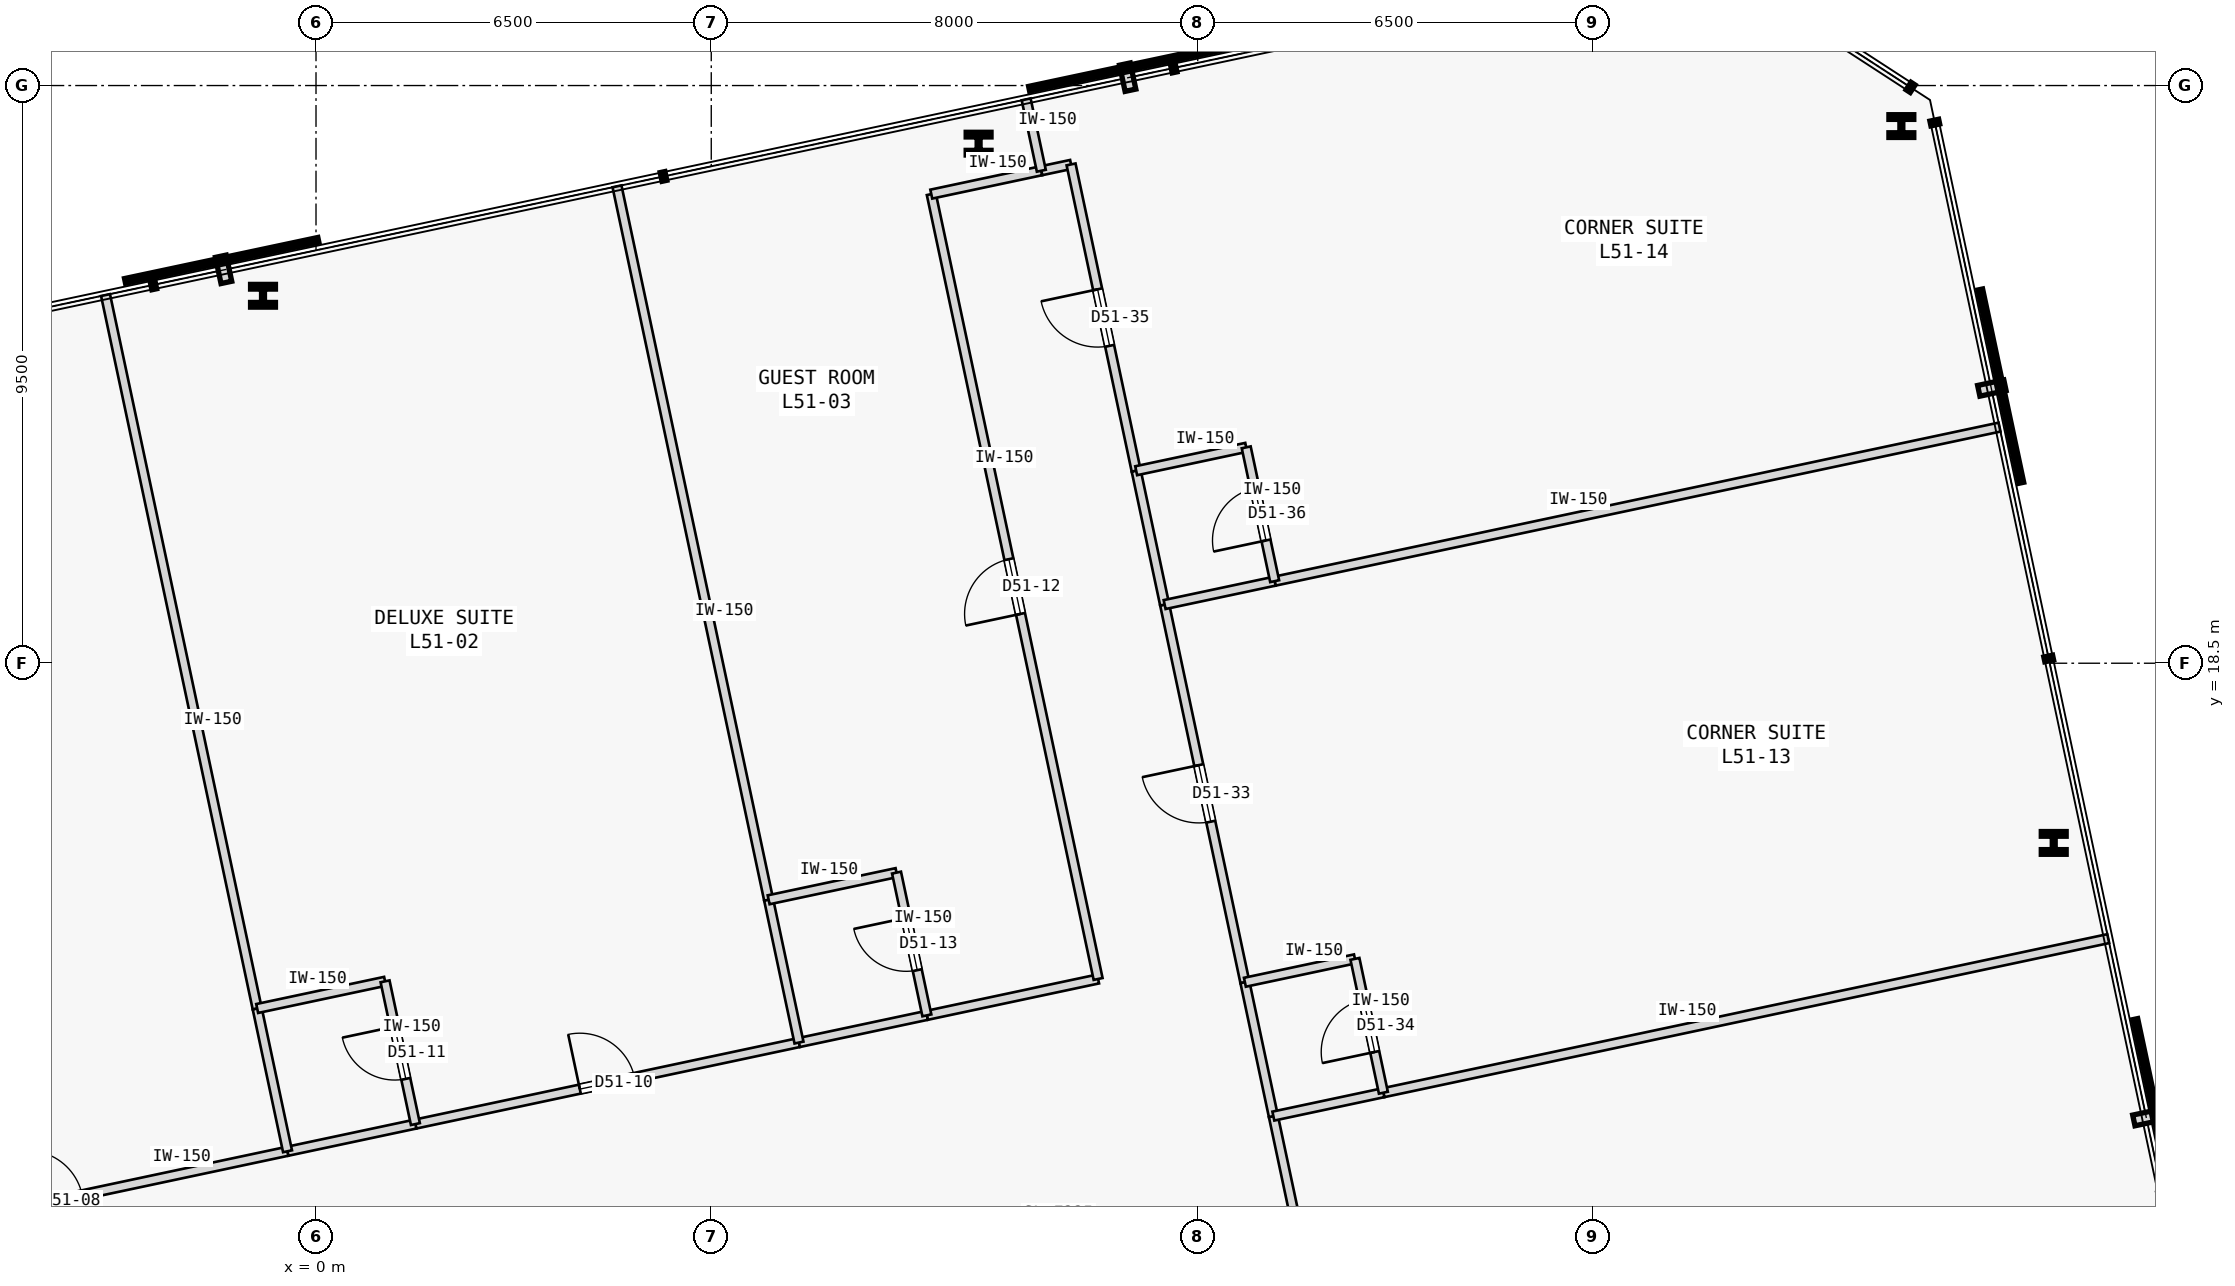
"""IFC4 building model, lengths in metres.
Left out: names, types, materials, properties, quantities, classifications, styles, units other than length and angle.
Written with IfcOpenShell. Run it as: python <this file> out.ifc"""

import sys

from ifc_helpers import new_model, si_unit, direction, frame, frame_2d, origin, origin_2d, place, context, subcontext, project, spatial, rectangle, i_section, extrude, element, fill, save


model = new_model("IFC4")
c1 = context("Model", 3, precision=1e-05, world=origin(), true_north=direction((0.0, 1.0)))
c2 = subcontext(c1, "Body", "Model", "MODEL_VIEW")
j1 = project(units=[si_unit("LENGTHUNIT", "METRE"), si_unit("PLANEANGLEUNIT", "RADIAN")], contexts=[c1])
p1 = place(None, origin())
s1 = spatial("IfcSite", under=j1, at=p1, CompositionType="ELEMENT")
p2 = place(p1, origin())
s2 = spatial("IfcBuilding", under=s1, at=p2, CompositionType="ELEMENT")
p3 = place(p2, frame((0.0, 0.0, 195.6)))
s3 = spatial("IfcBuildingStorey", under=s2, at=p3, CompositionType="ELEMENT", Elevation=195.6)
for number, where, z_axis, x_axis in (
    (1, (28.577, 15.545, 0.0), (0.0, 0.0, 1.0), (1.0, 0.0, 0.0)),
    (2, (26.071, 27.333, 0.0), (0.0, 0.0, 1.0), (1.0, 0.0, 0.0)),
    (3, (10.896, 27.044, 0.0), (0.0, 0.0, 1.0), (1.0, 0.0, 0.0)),
    (4, (-0.872, 24.543, 0.0), (0.0, 0.0, 1.0), (1.0, 0.0, 0.0)),
):
    element("IfcColumn", number, at=place(p3, frame(where, z_axis=z_axis, x_axis=x_axis)), inside=s3, PredefinedType="COLUMN", context=c2, shape_type="SweptSolid", body=[
        extrude(i_section(OverallWidth=0.409, OverallDepth=0.374, WebThickness=0.048, FlangeThickness=0.077, FilletRadius=0.015, at=origin_2d()), origin(), (0.0, 0.0, 1.0), 3.4),
    ])
p4 = place(p3, frame((-8.121, 8.848, 0.0), z_axis=(0.0, 0.0, 1.0), x_axis=(0.978146318695, 0.207917722244, 0.0)))
e5 = element("IfcWall", 5, at=p4, inside=s3, PredefinedType="PARTITIONING", context=c2, shape_type="SweptSolid", body=[
    extrude(rectangle(XDim=7.824, YDim=0.15, at=frame_2d((3.912, 0.0))), origin(), (0.0, 0.0, 1.0), 3.175),
])
p5 = place(p4, frame((3.452, 0.0, 0.0)))
e6 = element("IfcOpeningElement", 6, at=p5, cuts=e5, PredefinedType="OPENING", context=c2, shape_type="SweptSolid", body=[
    extrude(rectangle(XDim=0.92, YDim=2.15, at=frame_2d((0.46, 1.075))), frame((0.0, 0.085, 0.0), z_axis=(0.0, -1.0, 0.0), x_axis=(1.0, 0.0, 0.0)), (0.0, 0.0, 1.0), 0.17),
])
p6 = place(p3, frame((1.635, 10.921, 0.0), z_axis=(0.0, 0.0, 1.0), x_axis=(0.978147881284, 0.207910370927, 0.0)))
e7 = element("IfcWall", 7, at=p6, inside=s3, PredefinedType="PARTITIONING", context=c2, shape_type="SweptSolid", body=[
    extrude(rectangle(XDim=6.449, YDim=0.15, at=frame_2d((3.225, 0.0))), origin(), (0.0, 0.0, 1.0), 3.175),
])
p7 = place(p6, frame((2.764, 0.0, 0.0)))
e8 = element("IfcOpeningElement", 8, at=p7, cuts=e7, PredefinedType="OPENING", context=c2, shape_type="SweptSolid", body=[
    extrude(rectangle(XDim=0.92, YDim=2.15, at=frame_2d((0.46, 1.075))), frame((0.0, 0.085, 0.0), z_axis=(0.0, -1.0, 0.0), x_axis=(1.0, 0.0, 0.0)), (0.0, 0.0, 1.0), 0.17),
])
p8 = place(p3, frame((-0.469, 10.474, 0.0), z_axis=(0.0, 0.0, 1.0), x_axis=(0.978146728319, 0.207915795165, 0.0)))
e9 = element("IfcWall", 9, at=p8, inside=s3, PredefinedType="PARTITIONING", context=c2, shape_type="SweptSolid", body=[
    extrude(rectangle(XDim=2.15, YDim=0.15, at=frame_2d((1.075, 0.0))), origin(), (0.0, 0.0, 1.0), 3.175),
])
p9 = place(p3, frame((10.046, 12.709, 0.0), z_axis=(0.0, 0.0, 1.0), x_axis=(0.97816208355, 0.207843542851, 0.0)))
e10 = element("IfcWall", 10, at=p9, inside=s3, PredefinedType="PARTITIONING", context=c2, shape_type="SweptSolid", body=[
    extrude(rectangle(XDim=2.879, YDim=0.15, at=frame_2d((1.439, 0.0))), origin(), (0.0, 0.0, 1.0), 3.175),
])
p10 = place(p3, frame((12.862, 13.308, 0.0), z_axis=(0.0, 0.0, 1.0), x_axis=(-0.207911421929, 0.978147657888, 0.0)))
e11 = element("IfcWall", 11, at=p10, inside=s3, PredefinedType="PARTITIONING", context=c2, shape_type="SweptSolid", body=[
    extrude(rectangle(XDim=13.195, YDim=0.15, at=frame_2d((6.598, 0.0))), origin(), (0.0, 0.0, 1.0), 3.175),
])
p11 = place(p10, frame((6.137, 0.0, 0.0)))
e12 = element("IfcOpeningElement", 12, at=p11, cuts=e11, PredefinedType="OPENING", context=c2, shape_type="SweptSolid", body=[
    extrude(rectangle(XDim=0.92, YDim=2.15, at=frame_2d((0.46, 1.075))), frame((0.0, 0.085, 0.0), z_axis=(0.0, -1.0, 0.0), x_axis=(1.0, 0.0, 0.0)), (0.0, 0.0, 1.0), 0.17),
])
p12 = place(p3, frame((10.118, 26.214, 0.0), z_axis=(0.0, 0.0, 1.0), x_axis=(0.978133353907, 0.20797870558, 0.0)))
e13 = element("IfcWall", 13, at=p12, inside=s3, PredefinedType="PARTITIONING", context=c2, shape_type="SweptSolid", body=[
    extrude(rectangle(XDim=1.85, YDim=0.15, at=frame_2d((0.925, 0.0))), origin(), (0.0, 0.0, 1.0), 3.175),
])
p13 = place(p3, frame((7.943, 12.262, 0.0), z_axis=(0.0, 0.0, 1.0), x_axis=(0.978146728319, 0.207915795165, 0.0)))
e14 = element("IfcWall", 14, at=p13, inside=s3, PredefinedType="PARTITIONING", context=c2, shape_type="SweptSolid", body=[
    extrude(rectangle(XDim=2.15, YDim=0.15, at=frame_2d((1.075, 0.0))), origin(), (0.0, 0.0, 1.0), 3.175),
])
p14 = place(p3, frame((17.064, 4.841, 0.0), z_axis=(0.0, 0.0, 1.0), x_axis=(-0.207924511115, 0.978144875608, 0.0)))
e15 = element("IfcWall", 15, at=p14, inside=s3, PredefinedType="PARTITIONING", context=c2, shape_type="SweptSolid", body=[
    extrude(rectangle(XDim=6.35, YDim=0.15, at=frame_2d((3.175, 0.0))), origin(), (0.0, 0.0, 1.0), 3.175),
])
p15 = place(p14, frame((2.7, 0.0, 0.0)))
e16 = element("IfcOpeningElement", 16, at=p15, cuts=e15, PredefinedType="OPENING", context=c2, shape_type="SweptSolid", body=[
    extrude(rectangle(XDim=0.95, YDim=2.15, at=frame_2d((0.475, 1.075))), frame((0.0, 0.085, 0.0), z_axis=(0.0, -1.0, 0.0), x_axis=(1.0, 0.0, 0.0)), (0.0, 0.0, 1.0), 0.17),
])
p16 = place(p3, frame((15.276, 13.253, 0.0), z_axis=(0.0, 0.0, 1.0), x_axis=(-0.207924511115, 0.978144875608, 0.0)))
e17 = element("IfcWall", 17, at=p16, inside=s3, PredefinedType="PARTITIONING", context=c2, shape_type="SweptSolid", body=[
    extrude(rectangle(XDim=6.35, YDim=0.15, at=frame_2d((3.175, 0.0))), origin(), (0.0, 0.0, 1.0), 3.175),
])
p17 = place(p16, frame((2.7, 0.0, 0.0)))
e18 = element("IfcOpeningElement", 18, at=p17, cuts=e17, PredefinedType="OPENING", context=c2, shape_type="SweptSolid", body=[
    extrude(rectangle(XDim=0.95, YDim=2.15, at=frame_2d((0.475, 1.075))), frame((0.0, 0.085, 0.0), z_axis=(0.0, -1.0, 0.0), x_axis=(1.0, 0.0, 0.0)), (0.0, 0.0, 1.0), 0.17),
])
p18 = place(p3, frame((15.744, 11.052, 0.0), z_axis=(0.0, 0.0, 1.0), x_axis=(-0.207891197838, 0.978151956427, 0.0)))
e19 = element("IfcWall", 19, at=p18, inside=s3, PredefinedType="PARTITIONING", context=c2, shape_type="SweptSolid", body=[
    extrude(rectangle(XDim=2.25, YDim=0.15, at=frame_2d((1.125, 0.0))), origin(), (0.0, 0.0, 1.0), 3.175),
])
p19 = place(p3, frame((11.928, 26.599, 0.0), z_axis=(0.0, 0.0, 1.0), x_axis=(0.97822210712, 0.207560856478, 0.0)))
e20 = element("IfcWall", 20, at=p19, inside=s3, PredefinedType="PARTITIONING", context=c2, shape_type="SweptSolid", body=[
    extrude(rectangle(XDim=0.5, YDim=0.15, at=frame_2d((0.25, 0.0))), origin(), (0.0, 0.0, 1.0), 3.175),
])
p20 = place(p3, frame((13.488, 21.666, 0.0), z_axis=(0.0, 0.0, 1.0), x_axis=(-0.207926226209, 0.978144511028, 0.0)))
e21 = element("IfcWall", 21, at=p20, inside=s3, PredefinedType="PARTITIONING", context=c2, shape_type="SweptSolid", body=[
    extrude(rectangle(XDim=5.15, YDim=0.15, at=frame_2d((2.575, 0.0))), origin(), (0.0, 0.0, 1.0), 3.175),
])
p21 = place(p20, frame((2.1, 0.0, 0.0)))
e22 = element("IfcOpeningElement", 22, at=p21, cuts=e21, PredefinedType="OPENING", context=c2, shape_type="SweptSolid", body=[
    extrude(rectangle(XDim=0.95, YDim=2.15, at=frame_2d((0.475, 1.075))), frame((0.0, 0.085, 0.0), z_axis=(0.0, -1.0, 0.0), x_axis=(1.0, 0.0, 0.0)), (0.0, 0.0, 1.0), 0.17),
])
p22 = place(p3, frame((13.956, 19.465, 0.0), z_axis=(0.0, 0.0, 1.0), x_axis=(-0.207891197838, 0.978151956427, 0.0)))
e23 = element("IfcWall", 23, at=p22, inside=s3, PredefinedType="PARTITIONING", context=c2, shape_type="SweptSolid", body=[
    extrude(rectangle(XDim=2.25, YDim=0.15, at=frame_2d((1.125, 0.0))), origin(), (0.0, 0.0, 1.0), 3.175),
])
p23 = place(p3, frame((-0.967, 12.822, 0.0), z_axis=(0.0, 0.0, 1.0), x_axis=(-0.207914988081, 0.978146899873, 0.0)))
e24 = element("IfcWall", 24, at=p23, inside=s3, PredefinedType="PARTITIONING", context=c2, shape_type="SweptSolid", body=[
    extrude(rectangle(XDim=11.995, YDim=0.15, at=frame_2d((5.998, 0.0))), origin(), (0.0, 0.0, 1.0), 3.175),
])
p24 = place(p3, frame((-0.469, 10.474, 0.0), z_axis=(0.0, 0.0, 1.0), x_axis=(-0.207819824493, 0.978167123015, 0.0)))
e25 = element("IfcWall", 25, at=p24, inside=s3, PredefinedType="PARTITIONING", context=c2, shape_type="SweptSolid", body=[
    extrude(rectangle(XDim=2.4, YDim=0.15, at=frame_2d((1.2, 0.0))), origin(), (0.0, 0.0, 1.0), 3.175),
])
p25 = place(p3, frame((-0.967, 12.822, 0.0), z_axis=(0.0, 0.0, 1.0), x_axis=(0.978169816376, 0.207807146966, 0.0)))
e26 = element("IfcWall", 26, at=p25, inside=s3, PredefinedType="PARTITIONING", context=c2, shape_type="SweptSolid", body=[
    extrude(rectangle(XDim=2.15, YDim=0.15, at=frame_2d((1.075, 0.0))), origin(), (0.0, 0.0, 1.0), 3.175),
])
p26 = place(p3, frame((1.635, 10.921, 0.0), z_axis=(0.0, 0.0, 1.0), x_axis=(-0.207840504985, 0.978162729042, 0.0)))
e27 = element("IfcWall", 27, at=p26, inside=s3, PredefinedType="PARTITIONING", context=c2, shape_type="SweptSolid", body=[
    extrude(rectangle(XDim=2.4, YDim=0.15, at=frame_2d((1.2, 0.0))), origin(), (0.0, 0.0, 1.0), 3.175),
])
p27 = place(p26, frame((0.76, 0.0, 0.0)))
e28 = element("IfcOpeningElement", 28, at=p27, cuts=e27, PredefinedType="OPENING", context=c2, shape_type="SweptSolid", body=[
    extrude(rectangle(XDim=0.88, YDim=2.15, at=frame_2d((0.44, 1.075))), frame((0.0, 0.085, 0.0), z_axis=(0.0, -1.0, 0.0), x_axis=(1.0, 0.0, 0.0)), (0.0, 0.0, 1.0), 0.17),
])
p28 = place(p3, frame((7.444, 14.61, 0.0), z_axis=(0.0, 0.0, 1.0), x_axis=(-0.207910848762, 0.978147779718, 0.0)))
e29 = element("IfcWall", 29, at=p28, inside=s3, PredefinedType="PARTITIONING", context=c2, shape_type="SweptSolid", body=[
    extrude(rectangle(XDim=11.995, YDim=0.15, at=frame_2d((5.998, 0.0))), origin(), (0.0, 0.0, 1.0), 3.175),
])
p29 = place(p3, frame((7.943, 12.262, 0.0), z_axis=(0.0, 0.0, 1.0), x_axis=(-0.207937840262, 0.978142042133, 0.0)))
e30 = element("IfcWall", 30, at=p29, inside=s3, PredefinedType="PARTITIONING", context=c2, shape_type="SweptSolid", body=[
    extrude(rectangle(XDim=2.4, YDim=0.15, at=frame_2d((1.2, 0.0))), origin(), (0.0, 0.0, 1.0), 3.175),
])
p30 = place(p3, frame((7.444, 14.61, 0.0), z_axis=(0.0, 0.0, 1.0), x_axis=(0.978151636287, 0.207892704126, 0.0)))
e31 = element("IfcWall", 31, at=p30, inside=s3, PredefinedType="PARTITIONING", context=c2, shape_type="SweptSolid", body=[
    extrude(rectangle(XDim=2.15, YDim=0.15, at=frame_2d((1.075, 0.0))), origin(), (0.0, 0.0, 1.0), 3.175),
])
p31 = place(p3, frame((10.046, 12.709, 0.0), z_axis=(0.0, 0.0, 1.0), x_axis=(-0.207840504985, 0.978162729042, 0.0)))
e32 = element("IfcWall", 32, at=p31, inside=s3, PredefinedType="PARTITIONING", context=c2, shape_type="SweptSolid", body=[
    extrude(rectangle(XDim=2.4, YDim=0.15, at=frame_2d((1.2, 0.0))), origin(), (0.0, 0.0, 1.0), 3.175),
])
p32 = place(p31, frame((0.76, 0.0, 0.0)))
e33 = element("IfcOpeningElement", 33, at=p32, cuts=e32, PredefinedType="OPENING", context=c2, shape_type="SweptSolid", body=[
    extrude(rectangle(XDim=0.88, YDim=2.15, at=frame_2d((0.44, 1.075))), frame((0.0, 0.085, 0.0), z_axis=(0.0, -1.0, 0.0), x_axis=(1.0, 0.0, 0.0)), (0.0, 0.0, 1.0), 0.17),
])
p33 = place(p3, frame((11.928, 26.599, 0.0), z_axis=(0.0, 0.0, 1.0), x_axis=(-0.20795853359, 0.978137642823, 0.0)))
e34 = element("IfcWall", 34, at=p33, inside=s3, PredefinedType="PARTITIONING", context=c2, shape_type="SweptSolid", body=[
    extrude(rectangle(XDim=1.2, YDim=0.15, at=frame_2d((0.6, 0.0))), origin(), (0.0, 0.0, 1.0), 3.175),
])
p34 = place(p3, frame((17.553, 11.437, 0.0), z_axis=(0.0, 0.0, 1.0), x_axis=(0.97814556055, 0.207921288896, 0.0)))
e35 = element("IfcWall", 35, at=p34, inside=s3, PredefinedType="PARTITIONING", context=c2, shape_type="SweptSolid", body=[
    extrude(rectangle(XDim=12.187, YDim=0.15, at=frame_2d((6.094, 0.0))), origin(), (0.0, 0.0, 1.0), 3.175),
])
for number, where, z_axis, x_axis in (
    (36, (15.744, 11.052, 0.0), (0.0, 0.0, 1.0), (0.978, 0.208, 0.0)),
    (37, (15.276, 13.253, 0.0), (0.0, 0.0, 1.0), (0.978, 0.208, 0.0)),
):
    element("IfcWall", number, at=place(p3, frame(where, z_axis=z_axis, x_axis=x_axis)), inside=s3, PredefinedType="PARTITIONING", context=c2, shape_type="SweptSolid", body=[
        extrude(rectangle(XDim=1.85, YDim=0.15, at=frame_2d((0.925, 0.0))), origin(), (0.0, 0.0, 1.0), 3.175),
    ])
p35 = place(p3, frame((17.553, 11.437, 0.0), z_axis=(0.0, 0.0, 1.0), x_axis=(-0.207891197838, 0.978151956427, 0.0)))
e38 = element("IfcWall", 38, at=p35, inside=s3, PredefinedType="PARTITIONING", context=c2, shape_type="SweptSolid", body=[
    extrude(rectangle(XDim=2.25, YDim=0.15, at=frame_2d((1.125, 0.0))), origin(), (0.0, 0.0, 1.0), 3.175),
])
p36 = place(p35, frame((0.685, 0.0, 0.0)))
e39 = element("IfcOpeningElement", 39, at=p36, cuts=e38, PredefinedType="OPENING", context=c2, shape_type="SweptSolid", body=[
    extrude(rectangle(XDim=0.88, YDim=2.15, at=frame_2d((0.44, 1.075))), frame((0.0, 0.085, 0.0), z_axis=(0.0, -1.0, 0.0), x_axis=(1.0, 0.0, 0.0)), (0.0, 0.0, 1.0), 0.17),
])
p37 = place(p3, frame((15.765, 19.849, 0.0), z_axis=(0.0, 0.0, 1.0), x_axis=(0.978149634612, 0.207902121941, 0.0)))
e40 = element("IfcWall", 40, at=p37, inside=s3, PredefinedType="PARTITIONING", context=c2, shape_type="SweptSolid", body=[
    extrude(rectangle(XDim=12.187, YDim=0.15, at=frame_2d((6.094, 0.0))), origin(), (0.0, 0.0, 1.0), 3.175),
])
for number, where, z_axis, x_axis in (
    (41, (13.956, 19.465, 0.0), (0.0, 0.0, 1.0), (0.978, 0.208, 0.0)),
    (42, (13.488, 21.666, 0.0), (0.0, 0.0, 1.0), (0.978, 0.208, 0.0)),
):
    element("IfcWall", number, at=place(p3, frame(where, z_axis=z_axis, x_axis=x_axis)), inside=s3, PredefinedType="PARTITIONING", context=c2, shape_type="SweptSolid", body=[
        extrude(rectangle(XDim=1.85, YDim=0.15, at=frame_2d((0.925, 0.0))), origin(), (0.0, 0.0, 1.0), 3.175),
    ])
p38 = place(p3, frame((15.765, 19.849, 0.0), z_axis=(0.0, 0.0, 1.0), x_axis=(-0.207891197838, 0.978151956427, 0.0)))
e43 = element("IfcWall", 43, at=p38, inside=s3, PredefinedType="PARTITIONING", context=c2, shape_type="SweptSolid", body=[
    extrude(rectangle(XDim=2.25, YDim=0.15, at=frame_2d((1.125, 0.0))), origin(), (0.0, 0.0, 1.0), 3.175),
])
p39 = place(p38, frame((0.685, 0.0, 0.0)))
e44 = element("IfcOpeningElement", 44, at=p39, cuts=e43, PredefinedType="OPENING", context=c2, shape_type="SweptSolid", body=[
    extrude(rectangle(XDim=0.88, YDim=2.15, at=frame_2d((0.44, 1.075))), frame((0.0, 0.085, 0.0), z_axis=(0.0, -1.0, 0.0), x_axis=(1.0, 0.0, 0.0)), (0.0, 0.0, 1.0), 0.17),
])
p40 = place(p5, origin())
e45 = element("IfcDoor", 45, at=p40, inside=s3, OperationType="SINGLE_SWING_LEFT", PredefinedType="DOOR", context=c2, shape_type="SweptSolid", body=[
    extrude(rectangle(XDim=0.92, YDim=2.15, at=frame_2d((0.46, 1.075))), frame((0.0, 0.025, 0.0), z_axis=(0.0, -1.0, 0.0), x_axis=(1.0, 0.0, 0.0)), (0.0, 0.0, 1.0), 0.05),
])
fill(e6, e45)
p41 = place(p7, origin())
e46 = element("IfcDoor", 46, at=p41, inside=s3, OperationType="SINGLE_SWING_LEFT", PredefinedType="DOOR", context=c2, shape_type="SweptSolid", body=[
    extrude(rectangle(XDim=0.92, YDim=2.15, at=frame_2d((0.46, 1.075))), frame((0.0, 0.025, 0.0), z_axis=(0.0, -1.0, 0.0), x_axis=(1.0, 0.0, 0.0)), (0.0, 0.0, 1.0), 0.05),
])
fill(e8, e46)
p42 = place(p27, origin())
e47 = element("IfcDoor", 47, at=p42, inside=s3, OperationType="SINGLE_SWING_RIGHT", PredefinedType="DOOR", context=c2, shape_type="SweptSolid", body=[
    extrude(rectangle(XDim=0.88, YDim=2.15, at=frame_2d((0.44, 1.075))), frame((0.0, 0.025, 0.0), z_axis=(0.0, -1.0, 0.0), x_axis=(1.0, 0.0, 0.0)), (0.0, 0.0, 1.0), 0.05),
])
fill(e28, e47)
p43 = place(p11, origin())
e48 = element("IfcDoor", 48, at=p43, inside=s3, OperationType="SINGLE_SWING_LEFT", PredefinedType="DOOR", context=c2, shape_type="SweptSolid", body=[
    extrude(rectangle(XDim=0.92, YDim=2.15, at=frame_2d((0.46, 1.075))), frame((0.0, 0.025, 0.0), z_axis=(0.0, -1.0, 0.0), x_axis=(1.0, 0.0, 0.0)), (0.0, 0.0, 1.0), 0.05),
])
fill(e12, e48)
p44 = place(p32, origin())
e49 = element("IfcDoor", 49, at=p44, inside=s3, OperationType="SINGLE_SWING_RIGHT", PredefinedType="DOOR", context=c2, shape_type="SweptSolid", body=[
    extrude(rectangle(XDim=0.88, YDim=2.15, at=frame_2d((0.44, 1.075))), frame((0.0, 0.025, 0.0), z_axis=(0.0, -1.0, 0.0), x_axis=(1.0, 0.0, 0.0)), (0.0, 0.0, 1.0), 0.05),
])
fill(e33, e49)
p45 = place(p17, origin())
e50 = element("IfcDoor", 50, at=p45, inside=s3, OperationType="SINGLE_SWING_RIGHT", PredefinedType="DOOR", context=c2, shape_type="SweptSolid", body=[
    extrude(rectangle(XDim=0.95, YDim=2.15, at=frame_2d((0.475, 1.075))), frame((0.0, 0.025, 0.0), z_axis=(0.0, -1.0, 0.0), x_axis=(1.0, 0.0, 0.0)), (0.0, 0.0, 1.0), 0.05),
])
fill(e18, e50)
p46 = place(p36, origin())
e51 = element("IfcDoor", 51, at=p46, inside=s3, OperationType="SINGLE_SWING_LEFT", PredefinedType="DOOR", context=c2, shape_type="SweptSolid", body=[
    extrude(rectangle(XDim=0.88, YDim=2.15, at=frame_2d((0.44, 1.075))), frame((0.0, 0.025, 0.0), z_axis=(0.0, -1.0, 0.0), x_axis=(1.0, 0.0, 0.0)), (0.0, 0.0, 1.0), 0.05),
])
fill(e39, e51)
p47 = place(p21, origin())
e52 = element("IfcDoor", 52, at=p47, inside=s3, OperationType="SINGLE_SWING_RIGHT", PredefinedType="DOOR", context=c2, shape_type="SweptSolid", body=[
    extrude(rectangle(XDim=0.95, YDim=2.15, at=frame_2d((0.475, 1.075))), frame((0.0, 0.025, 0.0), z_axis=(0.0, -1.0, 0.0), x_axis=(1.0, 0.0, 0.0)), (0.0, 0.0, 1.0), 0.05),
])
fill(e22, e52)
p48 = place(p39, origin())
e53 = element("IfcDoor", 53, at=p48, inside=s3, OperationType="SINGLE_SWING_LEFT", PredefinedType="DOOR", context=c2, shape_type="SweptSolid", body=[
    extrude(rectangle(XDim=0.88, YDim=2.15, at=frame_2d((0.44, 1.075))), frame((0.0, 0.025, 0.0), z_axis=(0.0, -1.0, 0.0), x_axis=(1.0, 0.0, 0.0)), (0.0, 0.0, 1.0), 0.05),
])
fill(e44, e53)
save(model, sys.argv[1])
